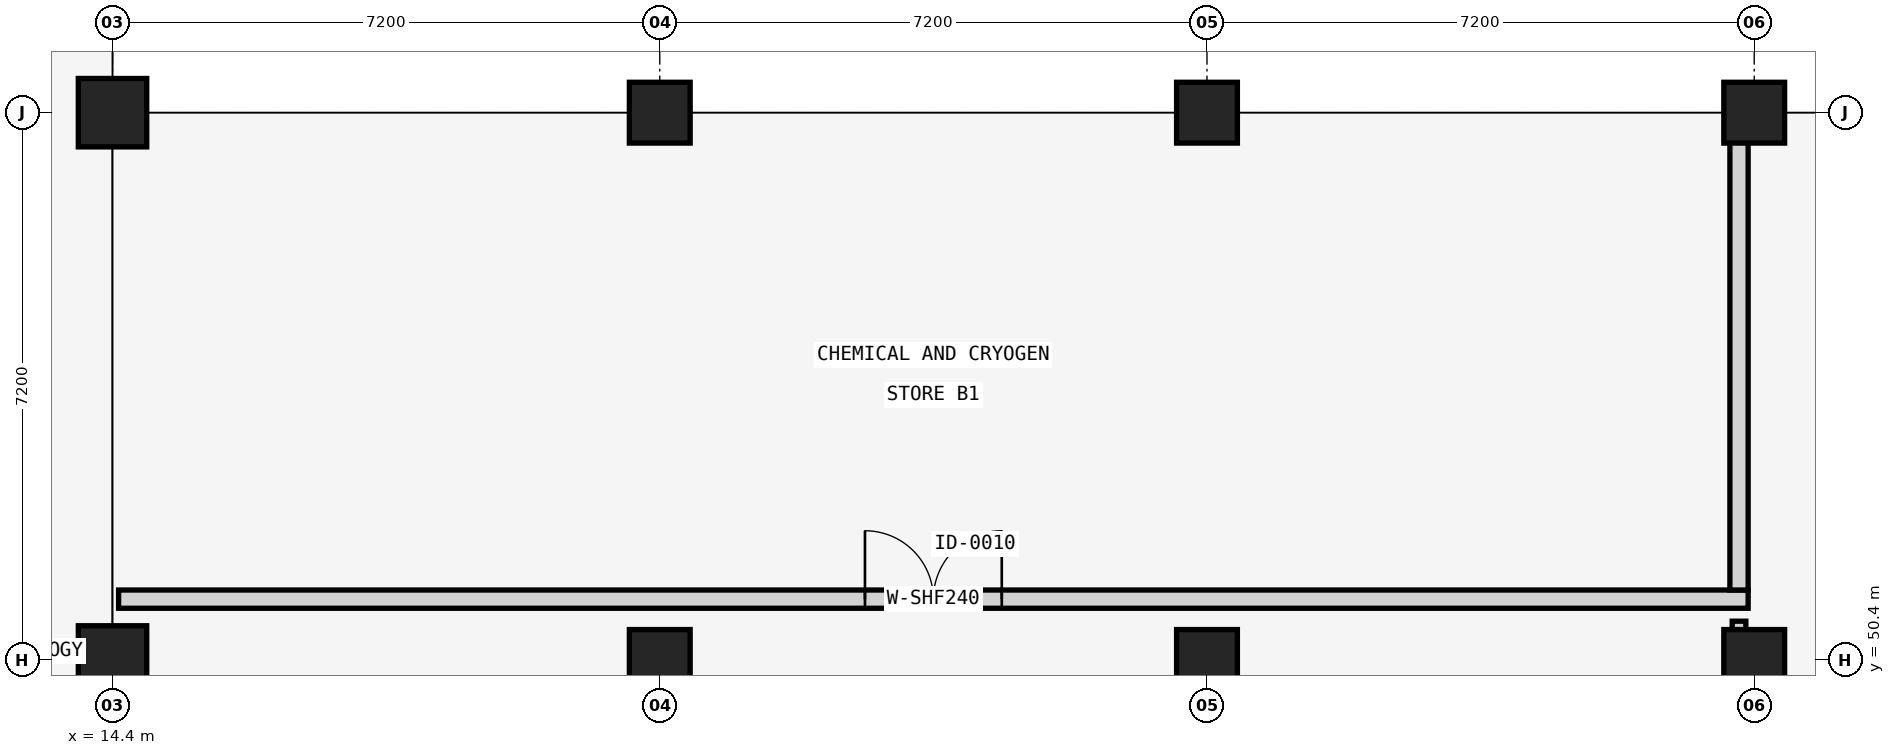
"""IFC4 building model, lengths in metres.
Left out: names, types, materials, properties, quantities, classifications, styles, units other than length and angle.
Written with IfcOpenShell. Run it as: python <this file> out.ifc"""

import sys

from ifc_helpers import new_model, si_unit, direction, frame, frame_2d, origin, origin_2d, place, context, subcontext, project, spatial, rectangle, extrude, element, fill, save


model = new_model("IFC4")
c1 = context("Model", 3, precision=1e-05, world=origin(), true_north=direction((0.0, 1.0)))
c2 = subcontext(c1, "Body", "Model", "MODEL_VIEW")
j1 = project(units=[si_unit("LENGTHUNIT", "METRE"), si_unit("PLANEANGLEUNIT", "RADIAN")], contexts=[c1])
p1 = place(None, origin())
s1 = spatial("IfcSite", under=j1, at=p1, CompositionType="ELEMENT")
p2 = place(p1, origin())
s2 = spatial("IfcBuilding", under=s1, at=p2, CompositionType="ELEMENT")
p3 = place(p2, frame((0.0, 0.0, -4.8)))
s3 = spatial("IfcBuildingStorey", under=s2, at=p3, CompositionType="ELEMENT", Elevation=-4.8)
for number, where, z_axis, x_axis in (
    (1, (14.4, 50.4, 0.0), (0.0, 0.0, 1.0), (1.0, 0.0, 0.0)),
    (2, (14.4, 57.6, 0.0), (0.0, 0.0, 1.0), (1.0, 0.0, 0.0)),
):
    element("IfcColumn", number, at=place(p3, frame(where, z_axis=z_axis, x_axis=x_axis)), inside=s3, PredefinedType="COLUMN", context=c2, shape_type="SweptSolid", body=[
        extrude(rectangle(XDim=0.9, YDim=0.9, at=origin_2d()), origin(), (0.0, 0.0, 1.0), 4.8),
    ])
for number, where, z_axis, x_axis in (
    (3, (21.6, 50.4, 0.0), (0.0, 0.0, 1.0), (1.0, 0.0, 0.0)),
    (4, (21.6, 57.6, 0.0), (0.0, 0.0, 1.0), (1.0, 0.0, 0.0)),
    (5, (28.8, 50.4, 0.0), (0.0, 0.0, 1.0), (1.0, 0.0, 0.0)),
    (6, (28.8, 57.6, 0.0), (0.0, 0.0, 1.0), (1.0, 0.0, 0.0)),
    (7, (36.0, 50.4, 0.0), (0.0, 0.0, 1.0), (1.0, 0.0, 0.0)),
    (8, (36.0, 57.6, 0.0), (0.0, 0.0, 1.0), (1.0, 0.0, 0.0)),
):
    element("IfcColumn", number, at=place(p3, frame(where, z_axis=z_axis, x_axis=x_axis)), inside=s3, PredefinedType="COLUMN", context=c2, shape_type="SweptSolid", body=[
        extrude(rectangle(XDim=0.8, YDim=0.8, at=origin_2d()), origin(), (0.0, 0.0, 1.0), 4.8),
    ])
p4 = place(p3, frame((35.8, 39.29, 0.0), z_axis=(0.0, 0.0, 1.0), x_axis=(0.0, 1.0, 0.0)))
e9 = element("IfcWall", 9, at=p4, inside=s3, PredefinedType="PARTITIONING", context=c2, shape_type="SweptSolid", body=[
    extrude(rectangle(XDim=11.62, YDim=0.18, at=frame_2d((5.81, 0.0))), origin(), (0.0, 0.0, 1.0), 3.7),
])
p5 = place(p3, frame((14.48, 51.2, 0.0), z_axis=(0.0, 0.0, 1.0), x_axis=(1.0, 0.0, 0.0)))
e10 = element("IfcWall", 10, at=p5, inside=s3, PredefinedType="SOLIDWALL", context=c2, shape_type="SweptSolid", body=[
    extrude(rectangle(XDim=21.44, YDim=0.24, at=frame_2d((10.72, 0.0))), origin(), (0.0, 0.0, 1.0), 3.7),
])
p6 = place(p5, frame((9.82, 0.0, 0.0)))
e11 = element("IfcOpeningElement", 11, at=p6, cuts=e10, PredefinedType="OPENING", context=c2, shape_type="SweptSolid", body=[
    extrude(rectangle(XDim=1.8, YDim=2.35, at=frame_2d((0.9, 1.175))), frame((0.0, 0.13, 0.0), z_axis=(0.0, -1.0, 0.0), x_axis=(1.0, 0.0, 0.0)), (0.0, 0.0, 1.0), 0.26),
])
p7 = place(p3, frame((35.8, 51.32, 0.0), z_axis=(0.0, 0.0, 1.0), x_axis=(0.0, 1.0, 0.0)))
e12 = element("IfcWall", 12, at=p7, inside=s3, PredefinedType="SOLIDWALL", context=c2, shape_type="SweptSolid", body=[
    extrude(rectangle(XDim=5.96, YDim=0.24, at=frame_2d((2.98, 0.0))), origin(), (0.0, 0.0, 1.0), 3.7),
])
p8 = place(p6, origin())
e13 = element("IfcDoor", 13, at=p8, inside=s3, OperationType="DOUBLE_DOOR_SINGLE_SWING", PredefinedType="DOOR", context=c2, shape_type="SweptSolid", body=[
    extrude(rectangle(XDim=1.8, YDim=2.35, at=frame_2d((0.9, 1.175))), frame((0.0, 0.025, 0.0), z_axis=(0.0, -1.0, 0.0), x_axis=(1.0, 0.0, 0.0)), (0.0, 0.0, 1.0), 0.05),
])
fill(e11, e13)
save(model, sys.argv[1])
